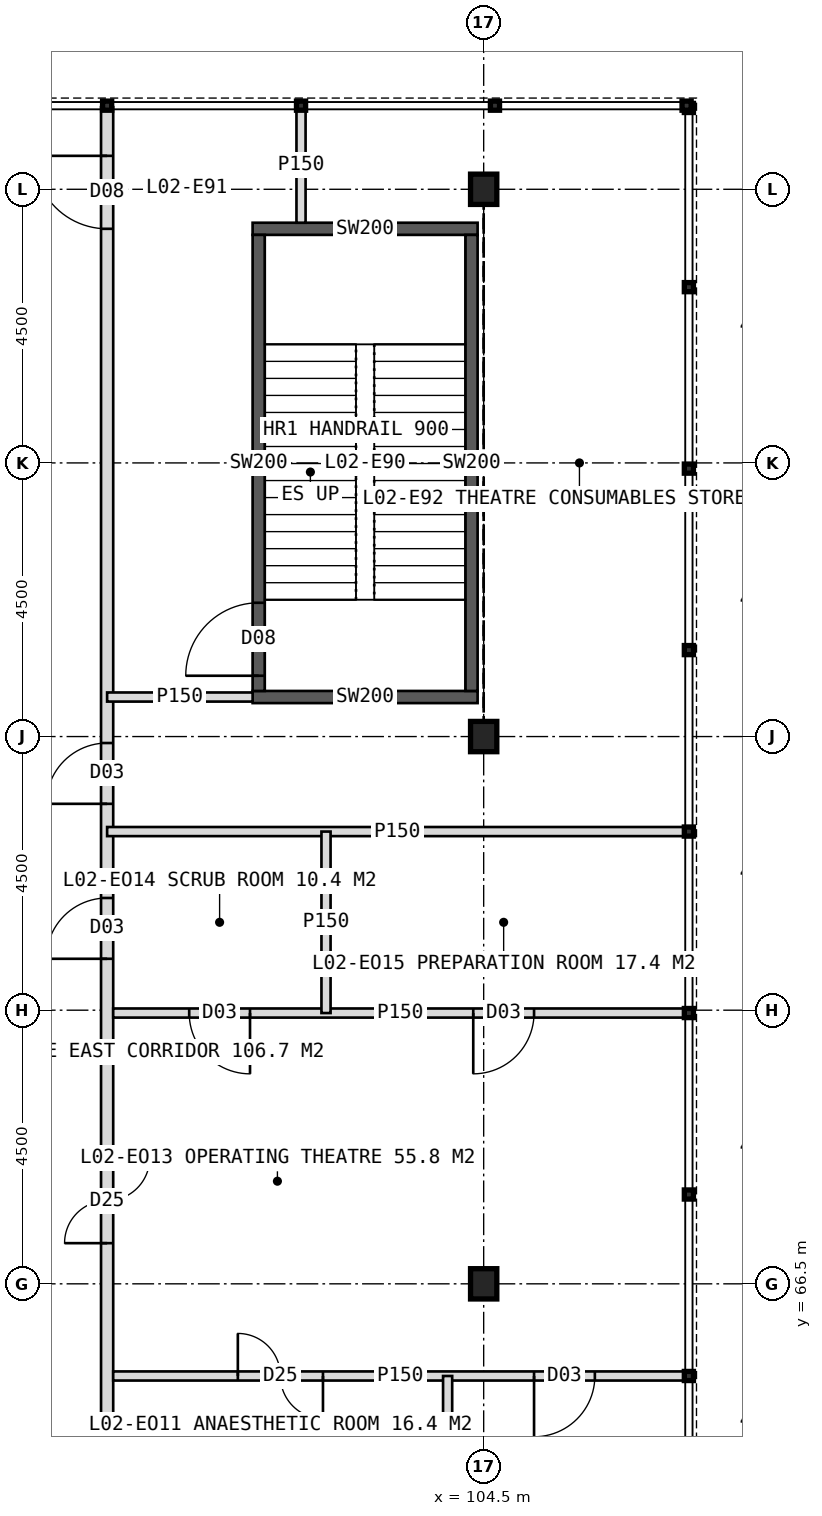
"""IFC4 building model, lengths in metres.
Left out: names, types, materials, properties, quantities, classifications, styles, units other than length and angle.
Written with IfcOpenShell. Run it as: python <this file> out.ifc"""

import sys

from ifc_helpers import new_model, si_unit, direction, frame, frame_2d, origin, origin_2d, place, context, subcontext, project, spatial, rectangle, i_section, extrude, element, fill, save


model = new_model("IFC4")
c1 = context("Model", 3, precision=1e-05, world=origin(), true_north=direction((0.0, 1.0)))
c2 = subcontext(c1, "Body", "Model", "MODEL_VIEW")
j1 = project(units=[si_unit("LENGTHUNIT", "METRE"), si_unit("PLANEANGLEUNIT", "RADIAN")], contexts=[c1])
p1 = place(None, origin())
s1 = spatial("IfcSite", under=j1, at=p1, CompositionType="ELEMENT")
p2 = place(p1, origin())
s2 = spatial("IfcBuilding", under=s1, at=p2, CompositionType="ELEMENT")
p3 = place(p2, frame((0.0, 0.0, 11.0)))
s3 = spatial("IfcBuildingStorey", under=s2, at=p3, CompositionType="ELEMENT", Elevation=11.0)
for number, where, z_axis, x_axis in (
    (1, (104.5, 66.5, 0.0), (0.0, 0.0, 1.0), (1.0, 0.0, 0.0)),
    (2, (104.5, 75.5, 0.0), (0.0, 0.0, 1.0), (1.0, 0.0, 0.0)),
    (3, (104.5, 84.5, 0.0), (0.0, 0.0, 1.0), (1.0, 0.0, 0.0)),
):
    element("IfcColumn", number, at=place(p3, frame(where, z_axis=z_axis, x_axis=x_axis)), inside=s3, PredefinedType="COLUMN", context=c2, shape_type="SweptSolid", body=[
        extrude(i_section(OverallWidth=0.432, OverallDepth=0.498, WebThickness=0.056, FlangeThickness=0.089, FilletRadius=0.015, at=origin_2d()), origin(), (0.0, 0.0, 1.0), 5.5),
    ])
p4 = place(p3, frame((98.307, 38.15, 0.0), z_axis=(0.0, 0.0, 1.0), x_axis=(0.0, 1.0, 0.0)))
e4 = element("IfcWall", 4, at=p4, inside=s3, PredefinedType="PARTITIONING", context=c2, shape_type="SweptSolid", body=[
    extrude(rectangle(XDim=47.7, YDim=0.2, at=frame_2d((23.85, 0.0))), origin(), (0.0, 0.0, 1.0), 5.2),
])
p5 = place(p4, frame((45.7, 0.0, 0.0)))
e5 = element("IfcOpeningElement", 5, at=p5, cuts=e4, PredefinedType="OPENING", context=c2, shape_type="SweptSolid", body=[
    extrude(rectangle(XDim=1.2, YDim=2.1, at=frame_2d((0.6, 1.05))), frame((0.0, 0.11, 0.0), z_axis=(0.0, -1.0, 0.0), x_axis=(1.0, 0.0, 0.0)), (0.0, 0.0, 1.0), 0.22),
])
p6 = place(p4, frame((36.244, 0.0, 0.0)))
e6 = element("IfcOpeningElement", 6, at=p6, cuts=e4, PredefinedType="OPENING", context=c2, shape_type="SweptSolid", body=[
    extrude(rectangle(XDim=1.0, YDim=2.1, at=frame_2d((0.5, 1.05))), frame((0.0, 0.11, 0.0), z_axis=(0.0, -1.0, 0.0), x_axis=(1.0, 0.0, 0.0)), (0.0, 0.0, 1.0), 0.22),
])
p7 = place(p4, frame((0.73, 0.0, 0.0)))
e7 = element("IfcOpeningElement", 7, at=p7, cuts=e4, PredefinedType="OPENING", context=c2, shape_type="SweptSolid", body=[
    extrude(rectangle(XDim=1.4, YDim=2.2, at=frame_2d((0.7, 1.1))), frame((0.0, 0.11, 0.0), z_axis=(0.0, -1.0, 0.0), x_axis=(1.0, 0.0, 0.0)), (0.0, 0.0, 1.0), 0.22),
])
p8 = place(p4, frame((5.144, 0.0, 0.0)))
e8 = element("IfcOpeningElement", 8, at=p8, cuts=e4, PredefinedType="OPENING", context=c2, shape_type="SweptSolid", body=[
    extrude(rectangle(XDim=1.4, YDim=2.2, at=frame_2d((0.7, 1.1))), frame((0.0, 0.11, 0.0), z_axis=(0.0, -1.0, 0.0), x_axis=(1.0, 0.0, 0.0)), (0.0, 0.0, 1.0), 0.22),
])
p9 = place(p4, frame((9.82, 0.0, 0.0)))
e9 = element("IfcOpeningElement", 9, at=p9, cuts=e4, PredefinedType="OPENING", context=c2, shape_type="SweptSolid", body=[
    extrude(rectangle(XDim=1.0, YDim=2.1, at=frame_2d((0.5, 1.05))), frame((0.0, 0.11, 0.0), z_axis=(0.0, -1.0, 0.0), x_axis=(1.0, 0.0, 0.0)), (0.0, 0.0, 1.0), 0.22),
])
p10 = place(p4, frame((12.605, 0.0, 0.0)))
e10 = element("IfcOpeningElement", 10, at=p10, cuts=e4, PredefinedType="OPENING", context=c2, shape_type="SweptSolid", body=[
    extrude(rectangle(XDim=1.4, YDim=2.2, at=frame_2d((0.7, 1.1))), frame((0.0, 0.11, 0.0), z_axis=(0.0, -1.0, 0.0), x_axis=(1.0, 0.0, 0.0)), (0.0, 0.0, 1.0), 0.22),
])
p11 = place(p4, frame((17.081, 0.0, 0.0)))
e11 = element("IfcOpeningElement", 11, at=p11, cuts=e4, PredefinedType="OPENING", context=c2, shape_type="SweptSolid", body=[
    extrude(rectangle(XDim=1.4, YDim=2.2, at=frame_2d((0.7, 1.1))), frame((0.0, 0.11, 0.0), z_axis=(0.0, -1.0, 0.0), x_axis=(1.0, 0.0, 0.0)), (0.0, 0.0, 1.0), 0.22),
])
p12 = place(p4, frame((21.758, 0.0, 0.0)))
e12 = element("IfcOpeningElement", 12, at=p12, cuts=e4, PredefinedType="OPENING", context=c2, shape_type="SweptSolid", body=[
    extrude(rectangle(XDim=1.0, YDim=2.1, at=frame_2d((0.5, 1.05))), frame((0.0, 0.11, 0.0), z_axis=(0.0, -1.0, 0.0), x_axis=(1.0, 0.0, 0.0)), (0.0, 0.0, 1.0), 0.22),
])
p13 = place(p4, frame((24.542, 0.0, 0.0)))
e13 = element("IfcOpeningElement", 13, at=p13, cuts=e4, PredefinedType="OPENING", context=c2, shape_type="SweptSolid", body=[
    extrude(rectangle(XDim=1.4, YDim=2.2, at=frame_2d((0.7, 1.1))), frame((0.0, 0.11, 0.0), z_axis=(0.0, -1.0, 0.0), x_axis=(1.0, 0.0, 0.0)), (0.0, 0.0, 1.0), 0.22),
])
p14 = place(p4, frame((29.019, 0.0, 0.0)))
e14 = element("IfcOpeningElement", 14, at=p14, cuts=e4, PredefinedType="OPENING", context=c2, shape_type="SweptSolid", body=[
    extrude(rectangle(XDim=1.4, YDim=2.2, at=frame_2d((0.7, 1.1))), frame((0.0, 0.11, 0.0), z_axis=(0.0, -1.0, 0.0), x_axis=(1.0, 0.0, 0.0)), (0.0, 0.0, 1.0), 0.22),
])
p15 = place(p4, frame((33.695, 0.0, 0.0)))
e15 = element("IfcOpeningElement", 15, at=p15, cuts=e4, PredefinedType="OPENING", context=c2, shape_type="SweptSolid", body=[
    extrude(rectangle(XDim=1.0, YDim=2.1, at=frame_2d((0.5, 1.05))), frame((0.0, 0.11, 0.0), z_axis=(0.0, -1.0, 0.0), x_axis=(1.0, 0.0, 0.0)), (0.0, 0.0, 1.0), 0.22),
])
for number, where, z_axis, x_axis in (
    (16, (100.7, 76.15, 0.0), (0.0, 0.0, 1.0), (1.0, 0.0, 0.0)),
    (17, (100.7, 83.85, 0.0), (0.0, 0.0, 1.0), (1.0, 0.0, 0.0)),
):
    element("IfcWall", number, at=place(p3, frame(where, z_axis=z_axis, x_axis=x_axis)), inside=s3, PredefinedType="SOLIDWALL", context=c2, shape_type="SweptSolid", body=[
        extrude(rectangle(XDim=3.7, YDim=0.2, at=frame_2d((1.85, 0.0))), origin(), (0.0, 0.0, 1.0), 5.2),
    ])
p16 = place(p3, frame((100.8, 76.25, 0.0), z_axis=(0.0, 0.0, 1.0), x_axis=(0.0, 1.0, 0.0)))
e18 = element("IfcWall", 18, at=p16, inside=s3, PredefinedType="SOLIDWALL", context=c2, shape_type="SweptSolid", body=[
    extrude(rectangle(XDim=7.5, YDim=0.2, at=frame_2d((3.75, 0.0))), origin(), (0.0, 0.0, 1.0), 5.2),
])
p17 = place(p16, frame((0.25, 0.0, 0.0)))
e19 = element("IfcOpeningElement", 19, at=p17, cuts=e18, PredefinedType="OPENING", context=c2, shape_type="SweptSolid", body=[
    extrude(rectangle(XDim=1.2, YDim=2.1, at=frame_2d((0.6, 1.05))), frame((0.0, 0.11, 0.0), z_axis=(0.0, -1.0, 0.0), x_axis=(1.0, 0.0, 0.0)), (0.0, 0.0, 1.0), 0.22),
])
p18 = place(p3, frame((104.3, 76.25, 0.0), z_axis=(0.0, 0.0, 1.0), x_axis=(0.0, 1.0, 0.0)))
e20 = element("IfcWall", 20, at=p18, inside=s3, PredefinedType="SOLIDWALL", context=c2, shape_type="SweptSolid", body=[
    extrude(rectangle(XDim=7.5, YDim=0.2, at=frame_2d((3.75, 0.0))), origin(), (0.0, 0.0, 1.0), 5.2),
])
p19 = place(p3, frame((100.7, 76.15, 0.0), z_axis=(0.0, 0.0, 1.0), x_axis=(-1.0, 0.0, 0.0)))
e21 = element("IfcWall", 21, at=p19, inside=s3, PredefinedType="PARTITIONING", context=c2, shape_type="SweptSolid", body=[
    extrude(rectangle(XDim=2.393, YDim=0.15, at=frame_2d((1.197, 0.0))), origin(), (0.0, 0.0, 1.0), 5.2),
])
p20 = place(p3, frame((101.496, 83.95, 0.0), z_axis=(0.0, 0.0, 1.0), x_axis=(0.0, 1.0, 0.0)))
e22 = element("IfcWall", 22, at=p20, inside=s3, PredefinedType="PARTITIONING", context=c2, shape_type="SweptSolid", body=[
    extrude(rectangle(XDim=1.9, YDim=0.15, at=frame_2d((0.95, 0.0))), origin(), (0.0, 0.0, 1.0), 5.2),
])
p21 = place(p3, frame((107.85, 73.938, 0.0), z_axis=(0.0, 0.0, 1.0), x_axis=(-1.0, 0.0, 0.0)))
e23 = element("IfcWall", 23, at=p21, inside=s3, PredefinedType="PARTITIONING", context=c2, shape_type="SweptSolid", body=[
    extrude(rectangle(XDim=9.543, YDim=0.15, at=frame_2d((4.771, 0.0))), origin(), (0.0, 0.0, 1.0), 5.2),
])
p22 = place(p3, frame((107.85, 64.984, 0.0), z_axis=(0.0, 0.0, 1.0), x_axis=(-1.0, 0.0, 0.0)))
e24 = element("IfcWall", 24, at=p22, inside=s3, PredefinedType="PARTITIONING", context=c2, shape_type="SweptSolid", body=[
    extrude(rectangle(XDim=9.443, YDim=0.15, at=frame_2d((4.722, 0.0))), origin(), (0.0, 0.0, 1.0), 5.2),
])
p23 = place(p22, frame((5.993, 0.0, 0.0)))
e25 = element("IfcOpeningElement", 25, at=p23, cuts=e24, PredefinedType="OPENING", context=c2, shape_type="SweptSolid", body=[
    extrude(rectangle(XDim=1.4, YDim=2.2, at=frame_2d((0.7, 1.1))), frame((0.0, 0.085, 0.0), z_axis=(0.0, -1.0, 0.0), x_axis=(1.0, 0.0, 0.0)), (0.0, 0.0, 1.0), 0.17),
])
p24 = place(p22, frame((1.521, 0.0, 0.0)))
e26 = element("IfcOpeningElement", 26, at=p24, cuts=e24, PredefinedType="OPENING", context=c2, shape_type="SweptSolid", body=[
    extrude(rectangle(XDim=1.0, YDim=2.1, at=frame_2d((0.5, 1.05))), frame((0.0, 0.085, 0.0), z_axis=(0.0, -1.0, 0.0), x_axis=(1.0, 0.0, 0.0)), (0.0, 0.0, 1.0), 0.17),
])
p25 = place(p3, frame((107.85, 70.953, 0.0), z_axis=(0.0, 0.0, 1.0), x_axis=(-1.0, 0.0, 0.0)))
e27 = element("IfcWall", 27, at=p25, inside=s3, PredefinedType="PARTITIONING", context=c2, shape_type="SweptSolid", body=[
    extrude(rectangle(XDim=9.443, YDim=0.15, at=frame_2d((4.722, 0.0))), origin(), (0.0, 0.0, 1.0), 5.2),
])
p26 = place(p25, frame((7.193, 0.0, 0.0)))
e28 = element("IfcOpeningElement", 28, at=p26, cuts=e27, PredefinedType="OPENING", context=c2, shape_type="SweptSolid", body=[
    extrude(rectangle(XDim=1.0, YDim=2.1, at=frame_2d((0.5, 1.05))), frame((0.0, 0.085, 0.0), z_axis=(0.0, -1.0, 0.0), x_axis=(1.0, 0.0, 0.0)), (0.0, 0.0, 1.0), 0.17),
])
p27 = place(p25, frame((2.521, 0.0, 0.0)))
e29 = element("IfcOpeningElement", 29, at=p27, cuts=e27, PredefinedType="OPENING", context=c2, shape_type="SweptSolid", body=[
    extrude(rectangle(XDim=1.0, YDim=2.1, at=frame_2d((0.5, 1.05))), frame((0.0, 0.085, 0.0), z_axis=(0.0, -1.0, 0.0), x_axis=(1.0, 0.0, 0.0)), (0.0, 0.0, 1.0), 0.17),
])
for number, where, z_axis, x_axis in (
    (30, (103.907, 62.0, 0.0), (0.0, 0.0, 1.0), (0.0, 1.0, 0.0)),
    (31, (101.907, 70.953, 0.0), (0.0, 0.0, 1.0), (0.0, 1.0, 0.0)),
):
    element("IfcWall", number, at=place(p3, frame(where, z_axis=z_axis, x_axis=x_axis)), inside=s3, PredefinedType="PARTITIONING", context=c2, shape_type="SweptSolid", body=[
        extrude(rectangle(XDim=2.984, YDim=0.15, at=frame_2d((1.492, 0.0))), origin(), (0.0, 0.0, 1.0), 5.2),
    ])
p28 = place(p17, origin())
e32 = element("IfcDoor", 32, at=p28, inside=s3, OperationType="SINGLE_SWING_LEFT", PredefinedType="DOOR", context=c2, shape_type="SweptSolid", body=[
    extrude(rectangle(XDim=1.2, YDim=2.1, at=frame_2d((0.6, 1.05))), frame((0.0, 0.025, 0.0), z_axis=(0.0, -1.0, 0.0), x_axis=(1.0, 0.0, 0.0)), (0.0, 0.0, 1.0), 0.05),
])
fill(e19, e32)
p29 = place(p5, origin())
e33 = element("IfcDoor", 33, at=p29, inside=s3, OperationType="SINGLE_SWING_RIGHT", PredefinedType="DOOR", context=c2, shape_type="SweptSolid", body=[
    extrude(rectangle(XDim=1.2, YDim=2.1, at=frame_2d((0.6, 1.05))), frame((0.0, 0.025, 0.0), z_axis=(0.0, -1.0, 0.0), x_axis=(1.0, 0.0, 0.0)), (0.0, 0.0, 1.0), 0.05),
])
fill(e5, e33)
p30 = place(p6, origin())
e34 = element("IfcDoor", 34, at=p30, inside=s3, OperationType="SINGLE_SWING_LEFT", PredefinedType="DOOR", context=c2, shape_type="SweptSolid", body=[
    extrude(rectangle(XDim=1.0, YDim=2.1, at=frame_2d((0.5, 1.05))), frame((0.0, 0.025, 0.0), z_axis=(0.0, -1.0, 0.0), x_axis=(1.0, 0.0, 0.0)), (0.0, 0.0, 1.0), 0.05),
])
fill(e6, e34)
p31 = place(p13, origin())
e35 = element("IfcDoor", 35, at=p31, inside=s3, OperationType="DOUBLE_DOOR_SINGLE_SWING", PredefinedType="DOOR", context=c2, shape_type="SweptSolid", body=[
    extrude(rectangle(XDim=1.4, YDim=2.2, at=frame_2d((0.7, 1.1))), frame((0.0, 0.025, 0.0), z_axis=(0.0, -1.0, 0.0), x_axis=(1.0, 0.0, 0.0)), (0.0, 0.0, 1.0), 0.05),
])
fill(e13, e35)
p32 = place(p23, origin())
e36 = element("IfcDoor", 36, at=p32, inside=s3, OperationType="DOUBLE_DOOR_SINGLE_SWING", PredefinedType="DOOR", context=c2, shape_type="SweptSolid", body=[
    extrude(rectangle(XDim=1.4, YDim=2.2, at=frame_2d((0.7, 1.1))), frame((0.0, 0.025, 0.0), z_axis=(0.0, -1.0, 0.0), x_axis=(1.0, 0.0, 0.0)), (0.0, 0.0, 1.0), 0.05),
])
fill(e25, e36)
p33 = place(p24, origin())
e37 = element("IfcDoor", 37, at=p33, inside=s3, OperationType="SINGLE_SWING_RIGHT", PredefinedType="DOOR", context=c2, shape_type="SweptSolid", body=[
    extrude(rectangle(XDim=1.0, YDim=2.1, at=frame_2d((0.5, 1.05))), frame((0.0, 0.025, 0.0), z_axis=(0.0, -1.0, 0.0), x_axis=(1.0, 0.0, 0.0)), (0.0, 0.0, 1.0), 0.05),
])
fill(e26, e37)
p34 = place(p14, origin())
e38 = element("IfcDoor", 38, at=p34, inside=s3, OperationType="DOUBLE_DOOR_SINGLE_SWING", PredefinedType="DOOR", context=c2, shape_type="SweptSolid", body=[
    extrude(rectangle(XDim=1.4, YDim=2.2, at=frame_2d((0.7, 1.1))), frame((0.0, 0.025, 0.0), z_axis=(0.0, -1.0, 0.0), x_axis=(1.0, 0.0, 0.0)), (0.0, 0.0, 1.0), 0.05),
])
fill(e14, e38)
p35 = place(p15, origin())
e39 = element("IfcDoor", 39, at=p35, inside=s3, OperationType="SINGLE_SWING_LEFT", PredefinedType="DOOR", context=c2, shape_type="SweptSolid", body=[
    extrude(rectangle(XDim=1.0, YDim=2.1, at=frame_2d((0.5, 1.05))), frame((0.0, 0.025, 0.0), z_axis=(0.0, -1.0, 0.0), x_axis=(1.0, 0.0, 0.0)), (0.0, 0.0, 1.0), 0.05),
])
fill(e15, e39)
p36 = place(p26, origin())
e40 = element("IfcDoor", 40, at=p36, inside=s3, OperationType="SINGLE_SWING_LEFT", PredefinedType="DOOR", context=c2, shape_type="SweptSolid", body=[
    extrude(rectangle(XDim=1.0, YDim=2.1, at=frame_2d((0.5, 1.05))), frame((0.0, 0.025, 0.0), z_axis=(0.0, -1.0, 0.0), x_axis=(1.0, 0.0, 0.0)), (0.0, 0.0, 1.0), 0.05),
])
fill(e28, e40)
p37 = place(p27, origin())
e41 = element("IfcDoor", 41, at=p37, inside=s3, OperationType="SINGLE_SWING_RIGHT", PredefinedType="DOOR", context=c2, shape_type="SweptSolid", body=[
    extrude(rectangle(XDim=1.0, YDim=2.1, at=frame_2d((0.5, 1.05))), frame((0.0, 0.025, 0.0), z_axis=(0.0, -1.0, 0.0), x_axis=(1.0, 0.0, 0.0)), (0.0, 0.0, 1.0), 0.05),
])
fill(e29, e41)
save(model, sys.argv[1])
